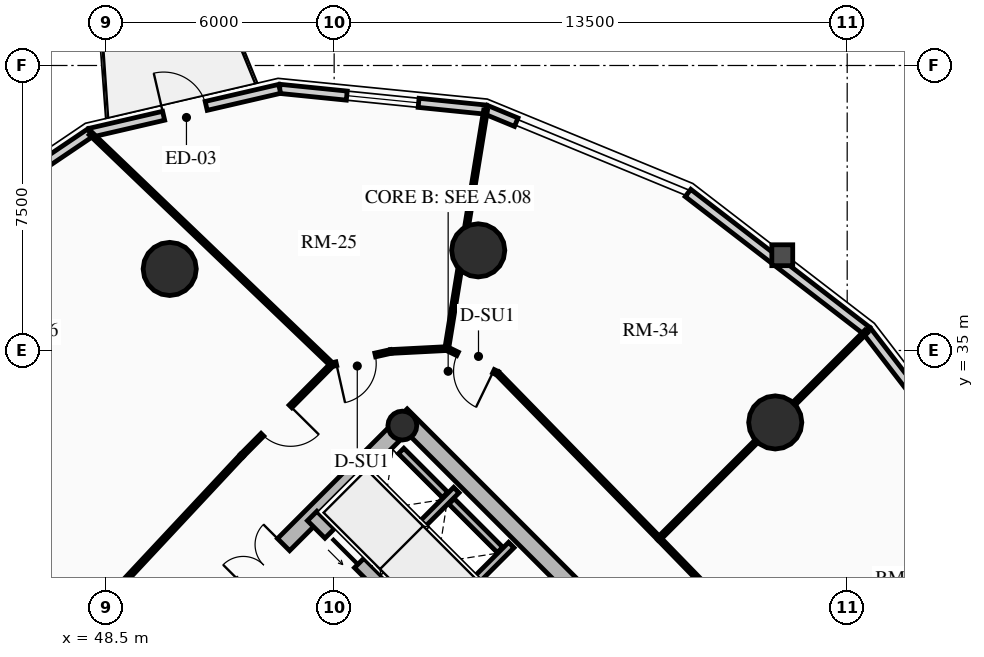
"""IFC4 building model, lengths in metres.
Left out: names, types, materials, properties, quantities, classifications, styles, units other than length and angle.
Written with IfcOpenShell. Run it as: python <this file> out.ifc"""

import sys

from ifc_helpers import new_model, si_unit, direction, frame, frame_2d, origin, origin_2d, place, context, subcontext, project, spatial, rectangle, circle, hollow_circle, extrude, source, transform, mapped, element, fill, save


model = new_model("IFC4")
c1 = context("Model", 3, precision=1e-05, world=origin(), true_north=direction((0.0, 1.0)))
c2 = subcontext(c1, "Body", "Model", "MODEL_VIEW")
j1 = project(units=[si_unit("LENGTHUNIT", "METRE"), si_unit("PLANEANGLEUNIT", "RADIAN")], contexts=[c1])
p1 = place(None, origin())
s1 = spatial("IfcSite", under=j1, at=p1, CompositionType="ELEMENT")
p2 = place(p1, origin())
s2 = spatial("IfcBuilding", under=s1, at=p2, CompositionType="ELEMENT")
p3 = place(p2, frame((0.0, 0.0, 96.34)))
s3 = spatial("IfcBuildingStorey", under=s2, at=p3, CompositionType="ELEMENT", Elevation=96.34)
p4 = place(p3, frame((66.303, 23.263, 0.0), z_axis=(0.0, 0.0, 1.0), x_axis=(-0.707106781187, 0.707106781187, 0.0)))
e1 = element("IfcWall", 1, at=p4, inside=s3, PredefinedType="SHEAR", context=c2, shape_type="SweptSolid", body=[
    extrude(rectangle(XDim=14.2, YDim=0.45, at=frame_2d((7.1, 0.0))), origin(), (0.0, 0.0, 1.0), 2.91),
])
p5 = place(p3, frame((48.856, 25.578, 0.0), z_axis=(0.0, 0.0, 1.0), x_axis=(0.707106781187, 0.707106781187, 0.0)))
e2 = element("IfcWall", 2, at=p5, inside=s3, PredefinedType="SHEAR", context=c2, shape_type="SweptSolid", body=[
    extrude(rectangle(XDim=10.7, YDim=0.45, at=frame_2d((5.35, 0.0))), origin(), (0.0, 0.0, 1.0), 2.91),
])
m1 = source(origin(), c2, "Body", "SweptSolid", [
    extrude(rectangle(XDim=1.5, YDim=2.02, at=frame_2d((0.75, 1.01))), frame((0.0, 0.235, 0.0), z_axis=(0.0, -1.0, 0.0), x_axis=(1.0, 0.0, 0.0)), (0.0, 0.0, 1.0), 0.47),
])
p6 = place(p5, frame((4.6, 0.0, 0.0)))
e3 = element("IfcOpeningElement", 3, at=p6, cuts=e2, PredefinedType="OPENING", context=c2, shape_type="MappedRepresentation", body=[
    mapped(m1, transform((0.0, 0.0, 0.0), x_axis=(1.0, 0.0, 0.0), y_axis=(0.0, 1.0, 0.0), z_axis=(0.0, 0.0, 1.0), scale=1.0)),
])
p7 = place(p3, frame((63.645, 20.922, 0.0), z_axis=(0.0, 0.0, 1.0), x_axis=(-0.707106781187, 0.707106781187, 0.0)))
e4 = element("IfcWall", 4, at=p7, inside=s3, PredefinedType="SHEAR", context=c2, shape_type="SweptSolid", body=[
    extrude(rectangle(XDim=13.75, YDim=0.35, at=frame_2d((6.875, 0.0))), origin(), (0.0, 0.0, 1.0), 2.91),
])
m2 = source(origin(), c2, "Body", "SweptSolid", [
    extrude(rectangle(XDim=1.1, YDim=2.015, at=frame_2d((0.55, 1.007))), frame((0.0, 0.185, 0.0), z_axis=(0.0, -1.0, 0.0), x_axis=(1.0, 0.0, 0.0)), (0.0, 0.0, 1.0), 0.37),
])
p8 = place(p7, frame((10.0, 0.0, 0.0)))
e5 = element("IfcOpeningElement", 5, at=p8, cuts=e4, PredefinedType="OPENING", context=c2, shape_type="MappedRepresentation", body=[
    mapped(m2, transform((0.0, 0.0, 0.0), x_axis=(1.0, 0.0, 0.0), y_axis=(0.0, 1.0, 0.0), z_axis=(0.0, 0.0, 1.0), scale=1.0)),
])
p9 = place(p7, frame((12.0, 0.0, 0.0)))
e6 = element("IfcOpeningElement", 6, at=p9, cuts=e4, PredefinedType="OPENING", context=c2, shape_type="MappedRepresentation", body=[
    mapped(m2, transform((0.0, 0.0, 0.0), x_axis=(1.0, 0.0, 0.0), y_axis=(0.0, 1.0, 0.0), z_axis=(0.0, 0.0, 1.0), scale=1.0)),
])
m3 = source(origin(), c2, "Body", "SweptSolid", [
    extrude(rectangle(XDim=1.15, YDim=2.02, at=frame_2d((0.575, 1.01))), frame((0.0, 0.185, 0.0), z_axis=(0.0, -1.0, 0.0), x_axis=(1.0, 0.0, 0.0)), (0.0, 0.0, 1.0), 0.37),
])
p10 = place(p7, frame((5.305, 0.0, 0.0)))
e7 = element("IfcOpeningElement", 7, at=p10, cuts=e4, PredefinedType="OPENING", context=c2, shape_type="MappedRepresentation", body=[
    mapped(m3, transform((0.0, 0.0, 0.0), x_axis=(1.0, 0.0, 0.0), y_axis=(0.0, 1.0, 0.0), z_axis=(0.0, 0.0, 1.0), scale=1.0)),
])
p11 = place(p3, frame((56.294, 33.024, 0.0), z_axis=(0.0, 0.0, 1.0), x_axis=(0.707106781187, 0.707106781187, 0.0)))
e8 = element("IfcColumn", 8, at=p11, inside=s3, PredefinedType="COLUMN", context=c2, shape_type="SweptSolid", body=[
    extrude(hollow_circle(Radius=0.38, WallThickness=0.032, at=origin_2d()), origin(), (0.0, 0.0, 1.0), 2.91),
])
for number, where, z_axis, x_axis in (
    (9, (66.107, 33.107, 0.0), (0.0, 0.0, 1.0), (1.0, 0.0, 0.0)),
    (10, (58.291, 37.635, 0.0), (0.0, 0.0, 1.0), (1.0, 0.0, 0.0)),
    (11, (50.173, 37.146, 0.0), (0.0, 0.0, 1.0), (1.0, 0.0, 0.0)),
):
    element("IfcColumn", number, at=place(p3, frame(where, z_axis=z_axis, x_axis=x_axis)), inside=s3, PredefinedType="USERDEFINED", context=c2, shape_type="SweptSolid", body=[
        extrude(circle(Radius=0.7, at=origin_2d()), origin(), (0.0, 0.0, 1.0), 2.91),
    ])
p12 = place(p3, frame((63.811, 39.145, 0.0), z_axis=(0.0, 0.0, 1.0), x_axis=(0.791982052206, -0.61054437102, 0.0)))
e12 = element("IfcWall", 12, at=p12, inside=s3, PredefinedType="SOLIDWALL", context=c2, shape_type="SweptSolid", body=[
    extrude(rectangle(XDim=5.942, YDim=0.24, at=frame_2d((2.971, 0.0))), origin(), (0.0, 0.0, 1.0), 2.179),
])
p13 = place(p3, frame((58.487, 41.339, 0.0), z_axis=(0.0, 0.0, 1.0), x_axis=(0.924556017656, -0.381046152345, 0.0)))
e13 = element("IfcWall", 13, at=p13, inside=s3, PredefinedType="SOLIDWALL", context=c2, shape_type="SweptSolid", body=[
    extrude(rectangle(XDim=0.87, YDim=0.24, at=frame_2d((0.435, 0.0))), origin(), (0.0, 0.0, 1.0), 2.179),
])
p14 = place(p3, frame((53.067, 41.885, 0.0), z_axis=(0.0, 0.0, 1.0), x_axis=(0.994971754311, -0.10015591906, 0.0)))
e14 = element("IfcWall", 14, at=p14, inside=s3, PredefinedType="SOLIDWALL", context=c2, shape_type="SweptSolid", body=[
    extrude(rectangle(XDim=5.448, YDim=0.24, at=frame_2d((2.724, 0.0))), origin(), (0.0, 0.0, 1.0), 2.179),
])
m4 = source(origin(), c2, "Body", "SweptSolid", [
    extrude(rectangle(XDim=1.9, YDim=1.35, at=frame_2d((0.95, 0.675))), frame((0.0, 0.13, 0.0), z_axis=(0.0, -1.0, 0.0), x_axis=(1.0, 0.0, 0.0)), (0.0, 0.0, 1.0), 0.26),
])
p15 = place(p14, frame((1.774, 0.0, 0.65)))
e15 = element("IfcOpeningElement", 15, at=p15, cuts=e14, PredefinedType="OPENING", context=c2, shape_type="MappedRepresentation", body=[
    mapped(m4, transform((0.0, 0.0, 0.0), x_axis=(1.0, 0.0, 0.0), y_axis=(0.0, 1.0, 0.0), z_axis=(0.0, 0.0, 1.0), scale=1.0)),
])
p16 = place(p3, frame((48.08, 40.729, 0.0), z_axis=(0.0, 0.0, 1.0), x_axis=(0.974165631126, 0.225834725257, 0.0)))
e16 = element("IfcWall", 16, at=p16, inside=s3, PredefinedType="SOLIDWALL", context=c2, shape_type="SweptSolid", body=[
    extrude(rectangle(XDim=5.119, YDim=0.24, at=frame_2d((2.56, 0.0))), origin(), (0.0, 0.0, 1.0), 2.179),
])
m5 = source(origin(), c2, "Body", "SweptSolid", [
    extrude(rectangle(XDim=1.15, YDim=2.005, at=frame_2d((0.575, 1.002))), frame((0.0, 0.13, 0.0), z_axis=(0.0, -1.0, 0.0), x_axis=(1.0, 0.0, 0.0)), (0.0, 0.0, 1.0), 0.26),
])
p17 = place(p16, frame((1.984, 0.0, 0.0)))
e17 = element("IfcOpeningElement", 17, at=p17, cuts=e16, PredefinedType="OPENING", context=c2, shape_type="MappedRepresentation", body=[
    mapped(m5, transform((0.0, 0.0, 0.0), x_axis=(1.0, 0.0, 0.0), y_axis=(0.0, 1.0, 0.0), z_axis=(0.0, 0.0, 1.0), scale=1.0)),
])
p18 = place(p3, frame((44.015, 37.985, 0.0), z_axis=(0.0, 0.0, 1.0), x_axis=(0.828781148131, 0.559572880421, 0.0)))
e18 = element("IfcWall", 18, at=p18, inside=s3, PredefinedType="SOLIDWALL", context=c2, shape_type="SweptSolid", body=[
    extrude(rectangle(XDim=4.905, YDim=0.24, at=frame_2d((2.452, 0.0))), origin(), (0.0, 0.0, 1.0), 2.179),
])
p19 = place(p3, frame((68.517, 35.517, 0.0), z_axis=(0.0, 0.0, 1.0), x_axis=(0.61054437102, -0.791982052206, 0.0)))
e19 = element("IfcWall", 19, at=p19, inside=s3, PredefinedType="SOLIDWALL", context=c2, shape_type="SweptSolid", body=[
    extrude(rectangle(XDim=5.942, YDim=0.24, at=frame_2d((2.971, 0.0))), origin(), (0.0, 0.0, 1.0), 2.179),
])
p20 = place(p19, frame((2.021, 0.0, 0.65)))
e20 = element("IfcOpeningElement", 20, at=p20, cuts=e19, PredefinedType="OPENING", context=c2, shape_type="MappedRepresentation", body=[
    mapped(m4, transform((0.0, 0.0, 0.0), x_axis=(1.0, 0.0, 0.0), y_axis=(0.0, 1.0, 0.0), z_axis=(0.0, 0.0, 1.0), scale=1.0)),
])
p21 = place(p3, frame((57.062, 27.781, 0.0), z_axis=(0.0, 0.0, 1.0), x_axis=(0.707106781187, 0.707106781187, 0.0)))
e21 = element("IfcWall", 21, at=p21, inside=s3, PredefinedType="SHEAR", context=c2, shape_type="SweptSolid", body=[
    extrude(rectangle(XDim=2.97, YDim=0.2, at=frame_2d((1.485, 0.0))), origin(), (0.0, 0.0, 1.0), 2.91),
])
p22 = place(p3, frame((55.615, 29.227, 0.0), z_axis=(0.0, 0.0, 1.0), x_axis=(0.707147878904, 0.70706568108, 0.0)))
e22 = element("IfcWall", 22, at=p22, inside=s3, PredefinedType="SHEAR", context=c2, shape_type="SweptSolid", body=[
    extrude(rectangle(XDim=2.97, YDim=0.2, at=frame_2d((1.485, 0.0))), origin(), (0.0, 0.0, 1.0), 2.91),
])
p23 = place(p3, frame((58.865, 29.754, 0.0), z_axis=(0.0, 0.0, 1.0), x_axis=(-0.707174411312, 0.707039144592, 0.0)))
e23 = element("IfcWall", 23, at=p23, inside=s3, PredefinedType="SHEAR", context=c2, shape_type="SweptSolid", body=[
    extrude(rectangle(XDim=1.805, YDim=0.2, at=frame_2d((0.902, 0.0))), origin(), (0.0, 0.0, 1.0), 2.91),
])
p24 = place(p3, frame((57.419, 31.2, 0.0), z_axis=(0.0, 0.0, 1.0), x_axis=(-0.707032117043, 0.707181437447, 0.0)))
e24 = element("IfcWall", 24, at=p24, inside=s3, PredefinedType="SHEAR", context=c2, shape_type="SweptSolid", body=[
    extrude(rectangle(XDim=1.635, YDim=0.2, at=frame_2d((0.817, 0.0))), origin(), (0.0, 0.0, 1.0), 2.91),
])
p25 = place(p3, frame((63.051, 30.051, 0.0), z_axis=(0.0, 0.0, 1.0), x_axis=(-0.698911483116, 0.715208178622, 0.0)))
e25 = element("IfcWall", 25, at=p25, inside=s3, PredefinedType="MOVABLE", context=c2, shape_type="SweptSolid", body=[
    extrude(rectangle(XDim=6.082, YDim=0.1, at=frame_2d((3.041, 0.0))), origin(), (0.0, 0.0, 1.0), 2.225),
])
p26 = place(p3, frame((58.8, 34.401, 0.0), z_axis=(0.0, 0.0, 1.0), x_axis=(-0.899620612635, 0.436672363818, 0.0)))
e26 = element("IfcWall", 26, at=p26, inside=s3, PredefinedType="MOVABLE", context=c2, shape_type="SweptSolid", body=[
    extrude(rectangle(XDim=1.487, YDim=0.1, at=frame_2d((0.743, 0.0))), origin(), (0.0, 0.0, 1.0), 2.225),
])
m6 = source(origin(), c2, "Body", "SweptSolid", [
    extrude(rectangle(XDim=1.05, YDim=2.015, at=frame_2d((0.525, 1.007))), frame((0.0, 0.06, 0.0), z_axis=(0.0, -1.0, 0.0), x_axis=(1.0, 0.0, 0.0)), (0.0, 0.0, 1.0), 0.12),
])
p27 = place(p26, frame((0.12, 0.0, 0.0)))
e27 = element("IfcOpeningElement", 27, at=p27, cuts=e26, PredefinedType="OPENING", context=c2, shape_type="MappedRepresentation", body=[
    mapped(m6, transform((0.0, 0.0, 0.0), x_axis=(1.0, 0.0, 0.0), y_axis=(0.0, 1.0, 0.0), z_axis=(0.0, 0.0, 1.0), scale=1.0)),
])
p28 = place(p3, frame((57.462, 35.05, 0.0), z_axis=(0.0, 0.0, 1.0), x_axis=(-0.998677016607, -0.051421945723, 0.0)))
e28 = element("IfcWall", 28, at=p28, inside=s3, PredefinedType="MOVABLE", context=c2, shape_type="SweptSolid", body=[
    extrude(rectangle(XDim=1.477, YDim=0.1, at=frame_2d((0.738, 0.0))), origin(), (0.0, 0.0, 1.0), 2.225),
])
p29 = place(p3, frame((55.988, 34.974, 0.0), z_axis=(0.0, 0.0, 1.0), x_axis=(-0.975666565154, -0.219259557695, 0.0)))
e29 = element("IfcWall", 29, at=p29, inside=s3, PredefinedType="MOVABLE", context=c2, shape_type="SweptSolid", body=[
    extrude(rectangle(XDim=1.587, YDim=0.1, at=frame_2d((0.793, 0.0))), origin(), (0.0, 0.0, 1.0), 2.225),
])
p30 = place(p29, frame((0.417, 0.0, 0.0)))
e30 = element("IfcOpeningElement", 30, at=p30, cuts=e29, PredefinedType="OPENING", context=c2, shape_type="MappedRepresentation", body=[
    mapped(m6, transform((0.0, 0.0, 0.0), x_axis=(1.0, 0.0, 0.0), y_axis=(0.0, 1.0, 0.0), z_axis=(0.0, 0.0, 1.0), scale=1.0)),
])
p31 = place(p3, frame((54.44, 34.626, 0.0), z_axis=(0.0, 0.0, 1.0), x_axis=(-0.703978840546, -0.710220945948, 0.0)))
e31 = element("IfcWall", 31, at=p31, inside=s3, PredefinedType="MOVABLE", context=c2, shape_type="SweptSolid", body=[
    extrude(rectangle(XDim=3.364, YDim=0.1, at=frame_2d((1.682, 0.0))), origin(), (0.0, 0.0, 1.0), 2.225),
])
p32 = place(p31, frame((1.546, 0.0, 0.0)))
e32 = element("IfcOpeningElement", 32, at=p32, cuts=e31, PredefinedType="OPENING", context=c2, shape_type="MappedRepresentation", body=[
    mapped(m6, transform((0.0, 0.0, 0.0), x_axis=(1.0, 0.0, 0.0), y_axis=(0.0, 1.0, 0.0), z_axis=(0.0, 0.0, 1.0), scale=1.0)),
])
p33 = place(p3, frame((52.072, 32.237, 0.0), z_axis=(0.0, 0.0, 1.0), x_axis=(-0.682528774423, -0.730858722383, 0.0)))
e33 = element("IfcWall", 33, at=p33, inside=s3, PredefinedType="MOVABLE", context=c2, shape_type="SweptSolid", body=[
    extrude(rectangle(XDim=6.486, YDim=0.1, at=frame_2d((3.243, 0.0))), origin(), (0.0, 0.0, 1.0), 2.225),
])
p34 = place(p3, frame((67.213, 25.768, 0.0), z_axis=(0.0, 0.0, 1.0), x_axis=(-0.696916079748, 0.717152687918, 0.0)))
e34 = element("IfcWall", 34, at=p34, inside=s3, PredefinedType="MOVABLE", context=c2, shape_type="SweptSolid", body=[
    extrude(rectangle(XDim=5.972, YDim=0.1, at=frame_2d((2.986, 0.0))), origin(), (0.0, 0.0, 1.0), 2.655),
])
m7 = source(origin(), c2, "Body", "SweptSolid", [
    extrude(rectangle(XDim=1.0, YDim=2.015, at=frame_2d((0.5, 1.007))), frame((0.0, 0.06, 0.0), z_axis=(0.0, -1.0, 0.0), x_axis=(1.0, 0.0, 0.0)), (0.0, 0.0, 1.0), 0.12),
])
p35 = place(p34, frame((2.486, 0.0, 0.0)))
e35 = element("IfcOpeningElement", 35, at=p35, cuts=e34, PredefinedType="OPENING", context=c2, shape_type="MappedRepresentation", body=[
    mapped(m7, transform((0.0, 0.0, 0.0), x_axis=(1.0, 0.0, 0.0), y_axis=(0.0, 1.0, 0.0), z_axis=(0.0, 0.0, 1.0), scale=1.0)),
])
p36 = place(p3, frame((63.051, 30.051, 0.0), z_axis=(0.0, 0.0, 1.0), x_axis=(0.707106781187, 0.707106781187, 0.0)))
e36 = element("IfcWall", 36, at=p36, inside=s3, PredefinedType="MOVABLE", context=c2, shape_type="SweptSolid", body=[
    extrude(rectangle(XDim=7.711, YDim=0.1, at=frame_2d((3.855, 0.0))), origin(), (0.0, 0.0, 1.0), 2.179),
])
p37 = place(p3, frame((57.462, 35.05, 0.0), z_axis=(0.0, 0.0, 1.0), x_axis=(0.160845392798, 0.98697961459, 0.0)))
e37 = element("IfcWall", 37, at=p37, inside=s3, PredefinedType="MOVABLE", context=c2, shape_type="SweptSolid", body=[
    extrude(rectangle(XDim=6.352, YDim=0.1, at=frame_2d((3.176, 0.0))), origin(), (0.0, 0.0, 1.0), 2.179),
])
p38 = place(p3, frame((54.44, 34.626, 0.0), z_axis=(0.0, 0.0, 1.0), x_axis=(-0.722045979822, 0.691845071547, 0.0)))
e38 = element("IfcWall", 38, at=p38, inside=s3, PredefinedType="MOVABLE", context=c2, shape_type="SweptSolid", body=[
    extrude(rectangle(XDim=8.795, YDim=0.1, at=frame_2d((4.397, 0.0))), origin(), (0.0, 0.0, 1.0), 2.179),
])
m8 = source(origin(), c2, "Body", "SweptSolid", [
    extrude(rectangle(XDim=1.9, YDim=1.35, at=frame_2d((0.95, 0.675))), frame((0.0, 0.03, 0.0), z_axis=(0.0, -1.0, 0.0), x_axis=(1.0, 0.0, 0.0)), (0.0, 0.0, 1.0), 0.06),
])
p39 = place(p15, origin())
e39 = element("IfcWindow", 39, at=p39, inside=s3, PartitioningType="DOUBLE_PANEL_VERTICAL", PredefinedType="WINDOW", context=c2, shape_type="MappedRepresentation", body=[
    mapped(m8, transform((0.0, 0.0, 0.0), x_axis=(1.0, 0.0, 0.0), y_axis=(0.0, 1.0, 0.0), z_axis=(0.0, 0.0, 1.0), scale=1.0)),
])
fill(e15, e39)
m9 = source(origin(), c2, "Body", "SweptSolid", [
    extrude(rectangle(XDim=1.15, YDim=2.005, at=frame_2d((0.575, 1.002))), frame((0.0, 0.025, 0.0), z_axis=(0.0, -1.0, 0.0), x_axis=(1.0, 0.0, 0.0)), (0.0, 0.0, 1.0), 0.05),
])
p40 = place(p17, origin())
e40 = element("IfcDoor", 40, at=p40, inside=s3, OperationType="SINGLE_SWING_LEFT", PredefinedType="DOOR", context=c2, shape_type="MappedRepresentation", body=[
    mapped(m9, transform((0.0, 0.0, 0.0), x_axis=(1.0, 0.0, 0.0), y_axis=(0.0, 1.0, 0.0), z_axis=(0.0, 0.0, 1.0), scale=1.0)),
])
fill(e17, e40)
m10 = source(origin(), c2, "Body", "SweptSolid", [
    extrude(rectangle(XDim=1.1, YDim=2.015, at=frame_2d((0.55, 1.007))), frame((0.0, 0.025, 0.0), z_axis=(0.0, -1.0, 0.0), x_axis=(1.0, 0.0, 0.0)), (0.0, 0.0, 1.0), 0.05),
])
p41 = place(p9, origin())
e41 = element("IfcDoor", 41, at=p41, inside=s3, OperationType="SLIDING_TO_LEFT", PredefinedType="DOOR", context=c2, shape_type="MappedRepresentation", body=[
    mapped(m10, transform((0.0, 0.0, 0.0), x_axis=(1.0, 0.0, 0.0), y_axis=(0.0, 1.0, 0.0), z_axis=(0.0, 0.0, 1.0), scale=1.0)),
])
fill(e6, e41)
m11 = source(origin(), c2, "Body", "SweptSolid", [
    extrude(rectangle(XDim=1.5, YDim=2.02, at=frame_2d((0.75, 1.01))), frame((0.0, 0.025, 0.0), z_axis=(0.0, -1.0, 0.0), x_axis=(1.0, 0.0, 0.0)), (0.0, 0.0, 1.0), 0.05),
])
p42 = place(p6, origin())
e42 = element("IfcDoor", 42, at=p42, inside=s3, OperationType="DOUBLE_DOOR_SINGLE_SWING", PredefinedType="DOOR", context=c2, shape_type="MappedRepresentation", body=[
    mapped(m11, transform((0.0, 0.0, 0.0), x_axis=(1.0, 0.0, 0.0), y_axis=(0.0, 1.0, 0.0), z_axis=(0.0, 0.0, 1.0), scale=1.0)),
])
fill(e3, e42)
m12 = source(origin(), c2, "Body", "SweptSolid", [
    extrude(rectangle(XDim=1.05, YDim=2.015, at=frame_2d((0.525, 1.007))), frame((0.0, 0.025, 0.0), z_axis=(0.0, -1.0, 0.0), x_axis=(1.0, 0.0, 0.0)), (0.0, 0.0, 1.0), 0.05),
])
p43 = place(p30, origin())
e43 = element("IfcDoor", 43, at=p43, inside=s3, OperationType="SINGLE_SWING_RIGHT", PredefinedType="DOOR", context=c2, shape_type="MappedRepresentation", body=[
    mapped(m12, transform((0.0, 0.0, 0.0), x_axis=(1.0, 0.0, 0.0), y_axis=(0.0, 1.0, 0.0), z_axis=(0.0, 0.0, 1.0), scale=1.0)),
])
fill(e30, e43)
p44 = place(p32, origin())
e44 = element("IfcDoor", 44, at=p44, inside=s3, OperationType="SINGLE_SWING_LEFT", PredefinedType="DOOR", context=c2, shape_type="MappedRepresentation", body=[
    mapped(m12, transform((0.0, 0.0, 0.0), x_axis=(1.0, 0.0, 0.0), y_axis=(0.0, 1.0, 0.0), z_axis=(0.0, 0.0, 1.0), scale=1.0)),
])
fill(e32, e44)
p45 = place(p27, origin())
e45 = element("IfcDoor", 45, at=p45, inside=s3, OperationType="SINGLE_SWING_LEFT", PredefinedType="DOOR", context=c2, shape_type="MappedRepresentation", body=[
    mapped(m12, transform((0.0, 0.0, 0.0), x_axis=(1.0, 0.0, 0.0), y_axis=(0.0, 1.0, 0.0), z_axis=(0.0, 0.0, 1.0), scale=1.0)),
])
fill(e27, e45)
save(model, sys.argv[1])
